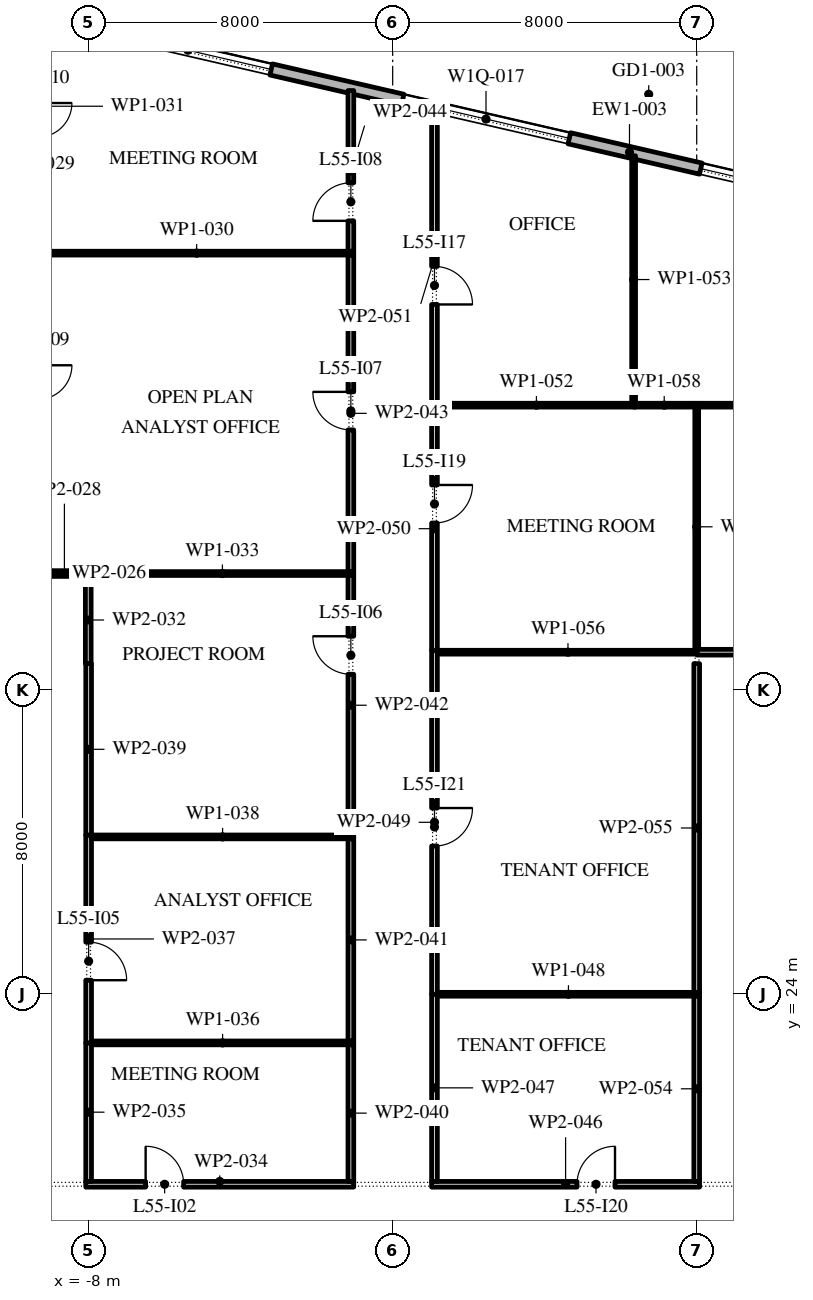
"""IFC4 building model, lengths in metres.
Left out: names, types, materials, properties, quantities, classifications, styles, units other than length and angle.
Written with IfcOpenShell. Run it as: python <this file> out.ifc"""

import sys

from ifc_helpers import new_model, si_unit, direction, frame, frame_2d, origin, place, context, subcontext, project, spatial, rectangle, extrude, element, fill, save


model = new_model("IFC4")
c1 = context("Model", 3, precision=1e-05, world=origin(), true_north=direction((0.0, 1.0)))
c2 = subcontext(c1, "Body", "Model", "MODEL_VIEW")
j1 = project(units=[si_unit("LENGTHUNIT", "METRE"), si_unit("PLANEANGLEUNIT", "RADIAN")], contexts=[c1])
p1 = place(None, origin())
s1 = spatial("IfcSite", under=j1, at=p1, CompositionType="ELEMENT")
p2 = place(p1, origin())
s2 = spatial("IfcBuilding", under=s1, at=p2, CompositionType="ELEMENT")
p3 = place(p2, frame((0.0, 0.0, 255.6)))
s3 = spatial("IfcBuildingStorey", under=s2, at=p3, CompositionType="ELEMENT", Elevation=255.6)
p4 = place(p3, frame((29.616, 40.758, 0.0), z_axis=(0.0, 0.0, 1.0), x_axis=(-0.974370532314, 0.224949029246, 0.0)))
e1 = element("IfcWall", 1, at=p4, inside=s3, PredefinedType="STANDARD", context=c2, shape_type="SweptSolid", body=[
    extrude(rectangle(XDim=48.0, YDim=0.3, at=frame_2d((24.0, 0.0))), origin(), (0.0, 0.0, 1.0), 4.0),
])
p5 = place(p4, frame((1.625, 0.0, 0.45)))
e2 = element("IfcOpeningElement", 2, at=p5, cuts=e1, PredefinedType="OPENING", context=c2, shape_type="SweptSolid", body=[
    extrude(rectangle(XDim=4.5, YDim=2.675, at=frame_2d((2.25, 1.337))), frame((0.0, 0.16, 0.0), z_axis=(0.0, -1.0, 0.0), x_axis=(1.0, 0.0, 0.0)), (0.0, 0.0, 1.0), 0.32),
])
p6 = place(p4, frame((10.575, 0.0, 0.0)))
e3 = element("IfcOpeningElement", 3, at=p6, cuts=e1, PredefinedType="OPENING", context=c2, shape_type="SweptSolid", body=[
    extrude(rectangle(XDim=2.4, YDim=3.5, at=frame_2d((1.2, 1.75))), frame((0.0, 0.16, 0.0), z_axis=(0.0, -1.0, 0.0), x_axis=(1.0, 0.0, 0.0)), (0.0, 0.0, 1.0), 0.32),
])
p7 = place(p4, frame((17.575, 0.0, 0.45)))
e4 = element("IfcOpeningElement", 4, at=p7, cuts=e1, PredefinedType="OPENING", context=c2, shape_type="SweptSolid", body=[
    extrude(rectangle(XDim=4.5, YDim=2.525, at=frame_2d((2.25, 1.262))), frame((0.0, 0.16, 0.0), z_axis=(0.0, -1.0, 0.0), x_axis=(1.0, 0.0, 0.0)), (0.0, 0.0, 1.0), 0.32),
])
p8 = place(p4, frame((25.625, 0.0, 0.45)))
e5 = element("IfcOpeningElement", 5, at=p8, cuts=e1, PredefinedType="OPENING", context=c2, shape_type="SweptSolid", body=[
    extrude(rectangle(XDim=4.5, YDim=2.45, at=frame_2d((2.25, 1.225))), frame((0.0, 0.16, 0.0), z_axis=(0.0, -1.0, 0.0), x_axis=(1.0, 0.0, 0.0)), (0.0, 0.0, 1.0), 0.32),
])
p9 = place(p4, frame((33.675, 0.0, 0.45)))
e6 = element("IfcOpeningElement", 6, at=p9, cuts=e1, PredefinedType="OPENING", context=c2, shape_type="SweptSolid", body=[
    extrude(rectangle(XDim=4.5, YDim=2.45, at=frame_2d((2.25, 1.225))), frame((0.0, 0.16, 0.0), z_axis=(0.0, -1.0, 0.0), x_axis=(1.0, 0.0, 0.0)), (0.0, 0.0, 1.0), 0.32),
])
p10 = place(p4, frame((42.775, 0.0, 0.0)))
e7 = element("IfcOpeningElement", 7, at=p10, cuts=e1, PredefinedType="OPENING", context=c2, shape_type="SweptSolid", body=[
    extrude(rectangle(XDim=2.4, YDim=3.5, at=frame_2d((1.2, 1.75))), frame((0.0, 0.16, 0.0), z_axis=(0.0, -1.0, 0.0), x_axis=(1.0, 0.0, 0.0)), (0.0, 0.0, 1.0), 0.32),
])
p11 = place(p3, frame((-9.34, 35.07, 0.0), z_axis=(0.0, 0.0, 1.0), x_axis=(1.0, 0.0, 0.0)))
e8 = element("IfcWall", 8, at=p11, inside=s3, PredefinedType="PARTITIONING", context=c2, shape_type="SweptSolid", body=[
    extrude(rectangle(XDim=1.405, YDim=0.15, at=frame_2d((0.703, 0.0))), origin(), (0.0, 0.0, 1.0), 4.0),
])
p12 = place(p3, frame((-9.29, 43.5, 0.0), z_axis=(0.0, 0.0, 1.0), x_axis=(1.0, 0.0, 0.0)))
e9 = element("IfcWall", 9, at=p12, inside=s3, PredefinedType="PARTITIONING", context=c2, shape_type="SweptSolid", body=[
    extrude(rectangle(XDim=8.265, YDim=0.1, at=frame_2d((4.133, 0.0))), origin(), (0.0, 0.0, 1.0), 4.0),
])
p13 = place(p3, frame((-8.01, 34.995, 0.0), z_axis=(0.0, 0.0, 1.0), x_axis=(0.0, -1.0, 0.0)))
e10 = element("IfcWall", 10, at=p13, inside=s3, PredefinedType="PARTITIONING", context=c2, shape_type="SweptSolid", body=[
    extrude(rectangle(XDim=2.295, YDim=0.15, at=frame_2d((1.147, 0.0))), origin(), (0.0, 0.0, 1.0), 4.0),
])
p14 = place(p3, frame((-7.935, 35.07, 0.0), z_axis=(0.0, 0.0, 1.0), x_axis=(1.0, 0.0, 0.0)))
e11 = element("IfcWall", 11, at=p14, inside=s3, PredefinedType="PARTITIONING", context=c2, shape_type="SweptSolid", body=[
    extrude(rectangle(XDim=6.91, YDim=0.1, at=frame_2d((3.455, 0.0))), origin(), (0.0, 0.0, 1.0), 4.0),
])
p15 = place(p3, frame((-8.075, 19.0, 0.0), z_axis=(0.0, 0.0, 1.0), x_axis=(1.0, 0.0, 0.0)))
e12 = element("IfcWall", 12, at=p15, inside=s3, PredefinedType="PARTITIONING", context=c2, shape_type="SweptSolid", body=[
    extrude(rectangle(XDim=7.05, YDim=0.15, at=frame_2d((3.525, 0.0))), origin(), (0.0, 0.0, 1.0), 4.0),
])
p16 = place(p15, frame((1.575, 0.0, 0.0)))
e13 = element("IfcOpeningElement", 13, at=p16, cuts=e12, PredefinedType="OPENING", context=c2, shape_type="SweptSolid", body=[
    extrude(rectangle(XDim=1.0, YDim=2.1, at=frame_2d((0.5, 1.05))), frame((0.0, 0.085, 0.0), z_axis=(0.0, -1.0, 0.0), x_axis=(1.0, 0.0, 0.0)), (0.0, 0.0, 1.0), 0.17),
])
p17 = place(p3, frame((-8.0, 22.72, 0.0), z_axis=(0.0, 0.0, 1.0), x_axis=(0.0, -1.0, 0.0)))
e14 = element("IfcWall", 14, at=p17, inside=s3, PredefinedType="PARTITIONING", context=c2, shape_type="SweptSolid", body=[
    extrude(rectangle(XDim=3.645, YDim=0.15, at=frame_2d((1.823, 0.0))), origin(), (0.0, 0.0, 1.0), 4.0),
])
p18 = place(p3, frame((-7.925, 22.72, 0.0), z_axis=(0.0, 0.0, 1.0), x_axis=(1.0, 0.0, 0.0)))
e15 = element("IfcWall", 15, at=p18, inside=s3, PredefinedType="PARTITIONING", context=c2, shape_type="SweptSolid", body=[
    extrude(rectangle(XDim=6.9, YDim=0.1, at=frame_2d((3.45, 0.0))), origin(), (0.0, 0.0, 1.0), 4.0),
])
p19 = place(p3, frame((-8.0, 28.19, 0.0), z_axis=(0.0, 0.0, 1.0), x_axis=(0.0, -1.0, 0.0)))
e16 = element("IfcWall", 16, at=p19, inside=s3, PredefinedType="PARTITIONING", context=c2, shape_type="SweptSolid", body=[
    extrude(rectangle(XDim=5.47, YDim=0.15, at=frame_2d((2.735, 0.0))), origin(), (0.0, 0.0, 1.0), 4.0),
])
p20 = place(p19, frame((2.82, 0.0, 0.0)))
e17 = element("IfcOpeningElement", 17, at=p20, cuts=e16, PredefinedType="OPENING", context=c2, shape_type="SweptSolid", body=[
    extrude(rectangle(XDim=1.0, YDim=2.1, at=frame_2d((0.5, 1.05))), frame((0.0, 0.085, 0.0), z_axis=(0.0, -1.0, 0.0), x_axis=(1.0, 0.0, 0.0)), (0.0, 0.0, 1.0), 0.17),
])
p21 = place(p3, frame((-7.925, 28.14, 0.0), z_axis=(0.0, 0.0, 1.0), x_axis=(1.0, 0.0, 0.0)))
e18 = element("IfcWall", 18, at=p21, inside=s3, PredefinedType="PARTITIONING", context=c2, shape_type="SweptSolid", body=[
    extrude(rectangle(XDim=6.9, YDim=0.1, at=frame_2d((3.45, 0.0))), origin(), (0.0, 0.0, 1.0), 4.0),
])
p22 = place(p3, frame((-8.0, 32.7, 0.0), z_axis=(0.0, 0.0, 1.0), x_axis=(0.0, -1.0, 0.0)))
e19 = element("IfcWall", 19, at=p22, inside=s3, PredefinedType="PARTITIONING", context=c2, shape_type="SweptSolid", body=[
    extrude(rectangle(XDim=4.51, YDim=0.15, at=frame_2d((2.255, 0.0))), origin(), (0.0, 0.0, 1.0), 4.0),
])
p23 = place(p3, frame((-1.1, 19.075, 0.0), z_axis=(0.0, 0.0, 1.0), x_axis=(0.0, 1.0, 0.0)))
e20 = element("IfcWall", 20, at=p23, inside=s3, PredefinedType="PARTITIONING", context=c2, shape_type="SweptSolid", body=[
    extrude(rectangle(XDim=3.595, YDim=0.15, at=frame_2d((1.797, 0.0))), origin(), (0.0, 0.0, 1.0), 4.0),
])
p24 = place(p3, frame((-1.1, 22.77, 0.0), z_axis=(0.0, 0.0, 1.0), x_axis=(0.0, 1.0, 0.0)))
e21 = element("IfcWall", 21, at=p24, inside=s3, PredefinedType="PARTITIONING", context=c2, shape_type="SweptSolid", body=[
    extrude(rectangle(XDim=5.32, YDim=0.15, at=frame_2d((2.66, 0.0))), origin(), (0.0, 0.0, 1.0), 4.0),
])
p25 = place(p3, frame((-1.1, 28.19, 0.0), z_axis=(0.0, 0.0, 1.0), x_axis=(0.0, 1.0, 0.0)))
e22 = element("IfcWall", 22, at=p25, inside=s3, PredefinedType="PARTITIONING", context=c2, shape_type="SweptSolid", body=[
    extrude(rectangle(XDim=6.83, YDim=0.15, at=frame_2d((3.415, 0.0))), origin(), (0.0, 0.0, 1.0), 4.0),
])
p26 = place(p25, frame((4.23, 0.0, 0.0)))
e23 = element("IfcOpeningElement", 23, at=p26, cuts=e22, PredefinedType="OPENING", context=c2, shape_type="SweptSolid", body=[
    extrude(rectangle(XDim=1.0, YDim=2.1, at=frame_2d((0.5, 1.05))), frame((0.0, 0.085, 0.0), z_axis=(0.0, -1.0, 0.0), x_axis=(1.0, 0.0, 0.0)), (0.0, 0.0, 1.0), 0.17),
])
p27 = place(p3, frame((-1.1, 35.12, 0.0), z_axis=(0.0, 0.0, 1.0), x_axis=(0.0, 1.0, 0.0)))
e24 = element("IfcWall", 24, at=p27, inside=s3, PredefinedType="PARTITIONING", context=c2, shape_type="SweptSolid", body=[
    extrude(rectangle(XDim=8.33, YDim=0.15, at=frame_2d((4.165, 0.0))), origin(), (0.0, 0.0, 1.0), 4.0),
])
p28 = place(p27, frame((3.73, 0.0, 0.0)))
e25 = element("IfcOpeningElement", 25, at=p28, cuts=e24, PredefinedType="OPENING", context=c2, shape_type="SweptSolid", body=[
    extrude(rectangle(XDim=1.0, YDim=2.1, at=frame_2d((0.5, 1.05))), frame((0.0, 0.085, 0.0), z_axis=(0.0, -1.0, 0.0), x_axis=(1.0, 0.0, 0.0)), (0.0, 0.0, 1.0), 0.17),
])
p29 = place(p3, frame((-1.1, 43.55, 0.0), z_axis=(0.0, 0.0, 1.0), x_axis=(0.0, 1.0, 0.0)))
e26 = element("IfcWall", 26, at=p29, inside=s3, PredefinedType="PARTITIONING", context=c2, shape_type="SweptSolid", body=[
    extrude(rectangle(XDim=4.228, YDim=0.15, at=frame_2d((2.114, 0.0))), origin(), (0.0, 0.0, 1.0), 4.0),
])
p30 = place(p29, frame((0.8, 0.0, 0.0)))
e27 = element("IfcOpeningElement", 27, at=p30, cuts=e26, PredefinedType="OPENING", context=c2, shape_type="SweptSolid", body=[
    extrude(rectangle(XDim=1.0, YDim=2.1, at=frame_2d((0.5, 1.05))), frame((0.0, 0.085, 0.0), z_axis=(0.0, -1.0, 0.0), x_axis=(1.0, 0.0, 0.0)), (0.0, 0.0, 1.0), 0.17),
])
p31 = place(p3, frame((1.025, 19.0, 0.0), z_axis=(0.0, 0.0, 1.0), x_axis=(1.0, 0.0, 0.0)))
e28 = element("IfcWall", 28, at=p31, inside=s3, PredefinedType="PARTITIONING", context=c2, shape_type="SweptSolid", body=[
    extrude(rectangle(XDim=7.05, YDim=0.15, at=frame_2d((3.525, 0.0))), origin(), (0.0, 0.0, 1.0), 4.0),
])
p32 = place(p31, frame((3.825, 0.0, 0.0)))
e29 = element("IfcOpeningElement", 29, at=p32, cuts=e28, PredefinedType="OPENING", context=c2, shape_type="SweptSolid", body=[
    extrude(rectangle(XDim=1.0, YDim=2.1, at=frame_2d((0.5, 1.05))), frame((0.0, 0.085, 0.0), z_axis=(0.0, -1.0, 0.0), x_axis=(1.0, 0.0, 0.0)), (0.0, 0.0, 1.0), 0.17),
])
p33 = place(p3, frame((1.1, 24.0, 0.0), z_axis=(0.0, 0.0, 1.0), x_axis=(0.0, -1.0, 0.0)))
e30 = element("IfcWall", 30, at=p33, inside=s3, PredefinedType="PARTITIONING", context=c2, shape_type="SweptSolid", body=[
    extrude(rectangle(XDim=4.925, YDim=0.15, at=frame_2d((2.462, 0.0))), origin(), (0.0, 0.0, 1.0), 4.0),
])
p34 = place(p3, frame((1.175, 24.0, 0.0), z_axis=(0.0, 0.0, 1.0), x_axis=(1.0, 0.0, 0.0)))
e31 = element("IfcWall", 31, at=p34, inside=s3, PredefinedType="PARTITIONING", context=c2, shape_type="SweptSolid", body=[
    extrude(rectangle(XDim=6.9, YDim=0.1, at=frame_2d((3.45, 0.0))), origin(), (0.0, 0.0, 1.0), 4.0),
])
p35 = place(p3, frame((1.1, 33.05, 0.0), z_axis=(0.0, 0.0, 1.0), x_axis=(0.0, -1.0, 0.0)))
e32 = element("IfcWall", 32, at=p35, inside=s3, PredefinedType="PARTITIONING", context=c2, shape_type="SweptSolid", body=[
    extrude(rectangle(XDim=9.05, YDim=0.15, at=frame_2d((4.525, 0.0))), origin(), (0.0, 0.0, 1.0), 4.0),
])
p36 = place(p35, frame((4.15, 0.0, 0.0)))
e33 = element("IfcOpeningElement", 33, at=p36, cuts=e32, PredefinedType="OPENING", context=c2, shape_type="SweptSolid", body=[
    extrude(rectangle(XDim=1.0, YDim=2.1, at=frame_2d((0.5, 1.05))), frame((0.0, 0.085, 0.0), z_axis=(0.0, -1.0, 0.0), x_axis=(1.0, 0.0, 0.0)), (0.0, 0.0, 1.0), 0.17),
])
p37 = place(p3, frame((1.1, 39.45, 0.0), z_axis=(0.0, 0.0, 1.0), x_axis=(0.0, -1.0, 0.0)))
e34 = element("IfcWall", 34, at=p37, inside=s3, PredefinedType="PARTITIONING", context=c2, shape_type="SweptSolid", body=[
    extrude(rectangle(XDim=6.4, YDim=0.15, at=frame_2d((3.2, 0.0))), origin(), (0.0, 0.0, 1.0), 4.0),
])
p38 = place(p37, frame((2.05, 0.0, 0.0)))
e35 = element("IfcOpeningElement", 35, at=p38, cuts=e34, PredefinedType="OPENING", context=c2, shape_type="SweptSolid", body=[
    extrude(rectangle(XDim=1.0, YDim=2.1, at=frame_2d((0.5, 1.05))), frame((0.0, 0.085, 0.0), z_axis=(0.0, -1.0, 0.0), x_axis=(1.0, 0.0, 0.0)), (0.0, 0.0, 1.0), 0.17),
])
p39 = place(p3, frame((1.1, 47.27, 0.0), z_axis=(0.0, 0.0, 1.0), x_axis=(0.0, -1.0, 0.0)))
e36 = element("IfcWall", 36, at=p39, inside=s3, PredefinedType="PARTITIONING", context=c2, shape_type="SweptSolid", body=[
    extrude(rectangle(XDim=7.82, YDim=0.15, at=frame_2d((3.91, 0.0))), origin(), (0.0, 0.0, 1.0), 4.0),
])
p40 = place(p39, frame((4.12, 0.0, 0.0)))
e37 = element("IfcOpeningElement", 37, at=p40, cuts=e36, PredefinedType="OPENING", context=c2, shape_type="SweptSolid", body=[
    extrude(rectangle(XDim=1.0, YDim=2.1, at=frame_2d((0.5, 1.05))), frame((0.0, 0.085, 0.0), z_axis=(0.0, -1.0, 0.0), x_axis=(1.0, 0.0, 0.0)), (0.0, 0.0, 1.0), 0.17),
])
p41 = place(p3, frame((6.39, 39.5, 0.0), z_axis=(0.0, 0.0, 1.0), x_axis=(-1.0, 0.0, 0.0)))
e38 = element("IfcWall", 38, at=p41, inside=s3, PredefinedType="PARTITIONING", context=c2, shape_type="SweptSolid", body=[
    extrude(rectangle(XDim=5.215, YDim=0.1, at=frame_2d((2.607, 0.0))), origin(), (0.0, 0.0, 1.0), 4.0),
])
p42 = place(p3, frame((6.34, 39.55, 0.0), z_axis=(0.0, 0.0, 1.0), x_axis=(0.0, 1.0, 0.0)))
e39 = element("IfcWall", 39, at=p42, inside=s3, PredefinedType="PARTITIONING", context=c2, shape_type="SweptSolid", body=[
    extrude(rectangle(XDim=6.511, YDim=0.1, at=frame_2d((3.255, 0.0))), origin(), (0.0, 0.0, 1.0), 4.0),
])
p43 = place(p3, frame((8.0, 19.075, 0.0), z_axis=(0.0, 0.0, 1.0), x_axis=(0.0, 1.0, 0.0)))
e40 = element("IfcWall", 40, at=p43, inside=s3, PredefinedType="PARTITIONING", context=c2, shape_type="SweptSolid", body=[
    extrude(rectangle(XDim=4.875, YDim=0.15, at=frame_2d((2.438, 0.0))), origin(), (0.0, 0.0, 1.0), 4.0),
])
p44 = place(p3, frame((8.0, 24.05, 0.0), z_axis=(0.0, 0.0, 1.0), x_axis=(0.0, 1.0, 0.0)))
e41 = element("IfcWall", 41, at=p44, inside=s3, PredefinedType="PARTITIONING", context=c2, shape_type="SweptSolid", body=[
    extrude(rectangle(XDim=8.65, YDim=0.15, at=frame_2d((4.325, 0.0))), origin(), (0.0, 0.0, 1.0), 4.0),
])
p45 = place(p3, frame((8.05, 33.0, 0.0), z_axis=(0.0, 0.0, 1.0), x_axis=(-1.0, 0.0, 0.0)))
e42 = element("IfcWall", 42, at=p45, inside=s3, PredefinedType="PARTITIONING", context=c2, shape_type="SweptSolid", body=[
    extrude(rectangle(XDim=6.875, YDim=0.1, at=frame_2d((3.438, 0.0))), origin(), (0.0, 0.0, 1.0), 4.0),
])
p46 = place(p3, frame((8.0, 33.05, 0.0), z_axis=(0.0, 0.0, 1.0), x_axis=(0.0, 1.0, 0.0)))
e43 = element("IfcWall", 43, at=p46, inside=s3, PredefinedType="PARTITIONING", context=c2, shape_type="SweptSolid", body=[
    extrude(rectangle(XDim=6.5, YDim=0.1, at=frame_2d((3.25, 0.0))), origin(), (0.0, 0.0, 1.0), 4.0),
])
p47 = place(p3, frame((7.95, 39.5, 0.0), z_axis=(0.0, 0.0, 1.0), x_axis=(-1.0, 0.0, 0.0)))
e44 = element("IfcWall", 44, at=p47, inside=s3, PredefinedType="PARTITIONING", context=c2, shape_type="SweptSolid", body=[
    extrude(rectangle(XDim=1.61, YDim=0.1, at=frame_2d((0.805, 0.0))), origin(), (0.0, 0.0, 1.0), 4.0),
])
p48 = place(p3, frame((8.01, 33.0, 0.0), z_axis=(0.0, 0.0, 1.0), x_axis=(1.0, 0.0, 0.0)))
e45 = element("IfcWall", 45, at=p48, inside=s3, PredefinedType="PARTITIONING", context=c2, shape_type="SweptSolid", body=[
    extrude(rectangle(XDim=6.255, YDim=0.15, at=frame_2d((3.127, 0.0))), origin(), (0.0, 0.0, 1.0), 4.0),
])
p49 = place(p48, frame((1.28, 0.0, 0.0)))
e46 = element("IfcOpeningElement", 46, at=p49, cuts=e45, PredefinedType="OPENING", context=c2, shape_type="SweptSolid", body=[
    extrude(rectangle(XDim=1.0, YDim=2.1, at=frame_2d((0.5, 1.05))), frame((0.0, 0.085, 0.0), z_axis=(0.0, -1.0, 0.0), x_axis=(1.0, 0.0, 0.0)), (0.0, 0.0, 1.0), 0.17),
])
p50 = place(p3, frame((22.08, 39.5, 0.0), z_axis=(0.0, 0.0, 1.0), x_axis=(-1.0, 0.0, 0.0)))
e47 = element("IfcWall", 47, at=p50, inside=s3, PredefinedType="PARTITIONING", context=c2, shape_type="SweptSolid", body=[
    extrude(rectangle(XDim=14.03, YDim=0.1, at=frame_2d((7.015, 0.0))), origin(), (0.0, 0.0, 1.0), 4.0),
])
p51 = place(p50, frame((8.0, 0.0, 0.0)))
e48 = element("IfcOpeningElement", 48, at=p51, cuts=e47, PredefinedType="OPENING", context=c2, shape_type="SweptSolid", body=[
    extrude(rectangle(XDim=0.9, YDim=2.1, at=frame_2d((0.45, 1.05))), frame((0.0, 0.06, 0.0), z_axis=(0.0, -1.0, 0.0), x_axis=(1.0, 0.0, 0.0)), (0.0, 0.0, 1.0), 0.12),
])
p52 = place(p7, origin())
e49 = element("IfcWindow", 49, at=p52, inside=s3, PartitioningType="DOUBLE_PANEL_VERTICAL", PredefinedType="WINDOW", context=c2, shape_type="SweptSolid", body=[
    extrude(rectangle(XDim=4.5, YDim=2.525, at=frame_2d((2.25, 1.262))), frame((0.0, 0.03, 0.0), z_axis=(0.0, -1.0, 0.0), x_axis=(1.0, 0.0, 0.0)), (0.0, 0.0, 1.0), 0.06),
])
fill(e4, e49)
p53 = place(p8, origin())
e50 = element("IfcWindow", 50, at=p53, inside=s3, PartitioningType="DOUBLE_PANEL_VERTICAL", PredefinedType="WINDOW", context=c2, shape_type="SweptSolid", body=[
    extrude(rectangle(XDim=4.5, YDim=2.45, at=frame_2d((2.25, 1.225))), frame((0.0, 0.03, 0.0), z_axis=(0.0, -1.0, 0.0), x_axis=(1.0, 0.0, 0.0)), (0.0, 0.0, 1.0), 0.06),
])
fill(e5, e50)
p54 = place(p9, origin())
e51 = element("IfcWindow", 51, at=p54, inside=s3, PartitioningType="DOUBLE_PANEL_VERTICAL", PredefinedType="WINDOW", context=c2, shape_type="SweptSolid", body=[
    extrude(rectangle(XDim=4.5, YDim=2.45, at=frame_2d((2.25, 1.225))), frame((0.0, 0.03, 0.0), z_axis=(0.0, -1.0, 0.0), x_axis=(1.0, 0.0, 0.0)), (0.0, 0.0, 1.0), 0.06),
])
fill(e6, e51)
p55 = place(p16, origin())
e52 = element("IfcDoor", 52, at=p55, inside=s3, OperationType="SINGLE_SWING_RIGHT", PredefinedType="DOOR", context=c2, shape_type="SweptSolid", body=[
    extrude(rectangle(XDim=1.0, YDim=2.1, at=frame_2d((0.5, 1.05))), frame((0.0, 0.025, 0.0), z_axis=(0.0, -1.0, 0.0), x_axis=(1.0, 0.0, 0.0)), (0.0, 0.0, 1.0), 0.05),
])
fill(e13, e52)
p56 = place(p20, origin())
e53 = element("IfcDoor", 53, at=p56, inside=s3, OperationType="SINGLE_SWING_LEFT", PredefinedType="DOOR", context=c2, shape_type="SweptSolid", body=[
    extrude(rectangle(XDim=1.0, YDim=2.1, at=frame_2d((0.5, 1.05))), frame((0.0, 0.025, 0.0), z_axis=(0.0, -1.0, 0.0), x_axis=(1.0, 0.0, 0.0)), (0.0, 0.0, 1.0), 0.05),
])
fill(e17, e53)
p57 = place(p26, origin())
e54 = element("IfcDoor", 54, at=p57, inside=s3, OperationType="SINGLE_SWING_LEFT", PredefinedType="DOOR", context=c2, shape_type="SweptSolid", body=[
    extrude(rectangle(XDim=1.0, YDim=2.1, at=frame_2d((0.5, 1.05))), frame((0.0, 0.025, 0.0), z_axis=(0.0, -1.0, 0.0), x_axis=(1.0, 0.0, 0.0)), (0.0, 0.0, 1.0), 0.05),
])
fill(e23, e54)
p58 = place(p28, origin())
e55 = element("IfcDoor", 55, at=p58, inside=s3, OperationType="SINGLE_SWING_LEFT", PredefinedType="DOOR", context=c2, shape_type="SweptSolid", body=[
    extrude(rectangle(XDim=1.0, YDim=2.1, at=frame_2d((0.5, 1.05))), frame((0.0, 0.025, 0.0), z_axis=(0.0, -1.0, 0.0), x_axis=(1.0, 0.0, 0.0)), (0.0, 0.0, 1.0), 0.05),
])
fill(e25, e55)
p59 = place(p30, origin())
e56 = element("IfcDoor", 56, at=p59, inside=s3, OperationType="SINGLE_SWING_RIGHT", PredefinedType="DOOR", context=c2, shape_type="SweptSolid", body=[
    extrude(rectangle(XDim=1.0, YDim=2.1, at=frame_2d((0.5, 1.05))), frame((0.0, 0.025, 0.0), z_axis=(0.0, -1.0, 0.0), x_axis=(1.0, 0.0, 0.0)), (0.0, 0.0, 1.0), 0.05),
])
fill(e27, e56)
p60 = place(p40, origin())
e57 = element("IfcDoor", 57, at=p60, inside=s3, OperationType="SINGLE_SWING_LEFT", PredefinedType="DOOR", context=c2, shape_type="SweptSolid", body=[
    extrude(rectangle(XDim=1.0, YDim=2.1, at=frame_2d((0.5, 1.05))), frame((0.0, 0.025, 0.0), z_axis=(0.0, -1.0, 0.0), x_axis=(1.0, 0.0, 0.0)), (0.0, 0.0, 1.0), 0.05),
])
fill(e37, e57)
p61 = place(p38, origin())
e58 = element("IfcDoor", 58, at=p61, inside=s3, OperationType="SINGLE_SWING_RIGHT", PredefinedType="DOOR", context=c2, shape_type="SweptSolid", body=[
    extrude(rectangle(XDim=1.0, YDim=2.1, at=frame_2d((0.5, 1.05))), frame((0.0, 0.025, 0.0), z_axis=(0.0, -1.0, 0.0), x_axis=(1.0, 0.0, 0.0)), (0.0, 0.0, 1.0), 0.05),
])
fill(e35, e58)
p62 = place(p32, origin())
e59 = element("IfcDoor", 59, at=p62, inside=s3, OperationType="SINGLE_SWING_LEFT", PredefinedType="DOOR", context=c2, shape_type="SweptSolid", body=[
    extrude(rectangle(XDim=1.0, YDim=2.1, at=frame_2d((0.5, 1.05))), frame((0.0, 0.025, 0.0), z_axis=(0.0, -1.0, 0.0), x_axis=(1.0, 0.0, 0.0)), (0.0, 0.0, 1.0), 0.05),
])
fill(e29, e59)
p63 = place(p36, origin())
e60 = element("IfcDoor", 60, at=p63, inside=s3, OperationType="SINGLE_SWING_RIGHT", PredefinedType="DOOR", context=c2, shape_type="SweptSolid", body=[
    extrude(rectangle(XDim=1.0, YDim=2.1, at=frame_2d((0.5, 1.05))), frame((0.0, 0.025, 0.0), z_axis=(0.0, -1.0, 0.0), x_axis=(1.0, 0.0, 0.0)), (0.0, 0.0, 1.0), 0.05),
])
fill(e33, e60)
save(model, sys.argv[1])
